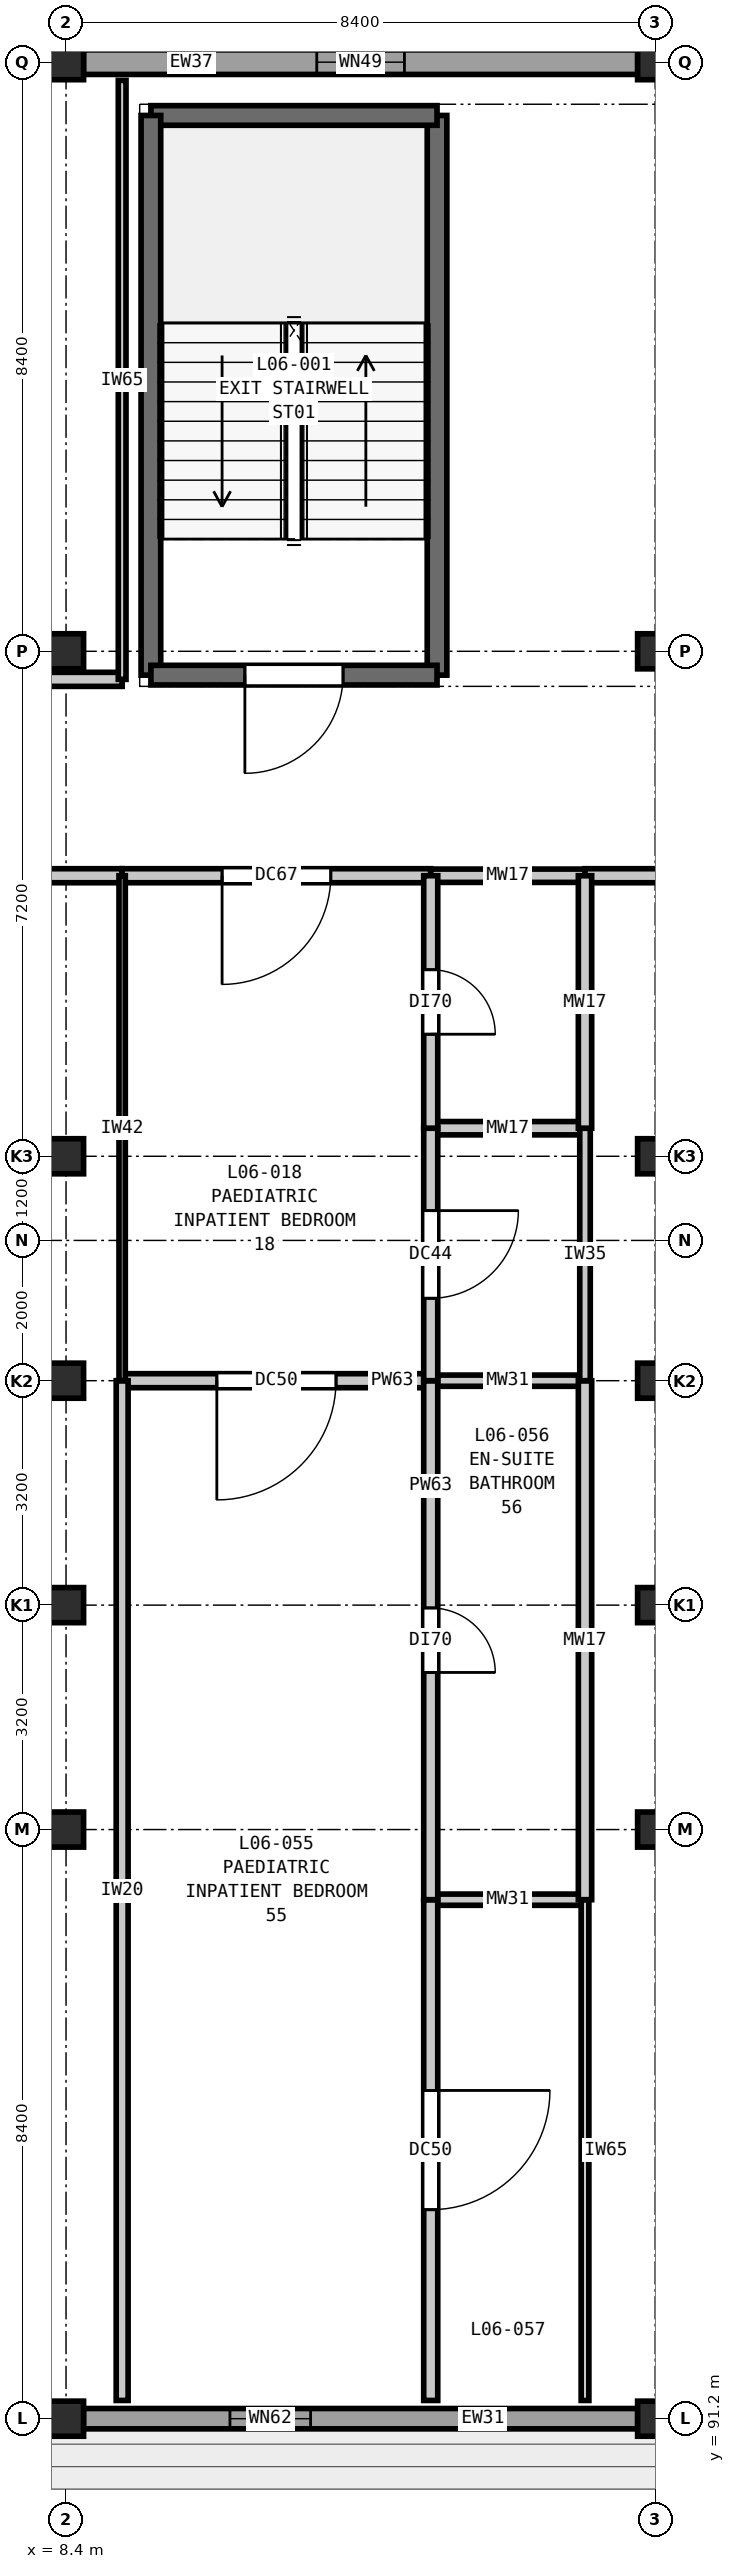
"""IFC4 building model, lengths in metres.
Left out: names, types, materials, properties, quantities, classifications, styles, units other than length and angle.
Written with IfcOpenShell. Run it as: python <this file> out.ifc"""

import sys

from ifc_helpers import new_model, si_unit, direction, frame, frame_2d, origin, origin_2d, place, context, subcontext, project, spatial, rectangle, extrude, element, fill, save


model = new_model("IFC4")
c1 = context("Model", 3, precision=1e-05, world=origin(), true_north=direction((0.0, 1.0)))
c2 = subcontext(c1, "Body", "Model", "MODEL_VIEW")
j1 = project(units=[si_unit("LENGTHUNIT", "METRE"), si_unit("PLANEANGLEUNIT", "RADIAN")], contexts=[c1])
p1 = place(None, origin())
s1 = spatial("IfcSite", under=j1, at=p1, CompositionType="ELEMENT")
p2 = place(p1, origin())
s2 = spatial("IfcBuilding", under=s1, at=p2, CompositionType="ELEMENT")
p3 = place(p2, frame((0.0, 0.0, 28.8)))
s3 = spatial("IfcBuildingStorey", under=s2, at=p3, CompositionType="ELEMENT", Elevation=28.8)
for number, where, z_axis, x_axis in (
    (1, (8.4, 91.2, 0.0), (0.0, 0.0, 1.0), (1.0, 0.0, 0.0)),
    (2, (8.4, 99.6, 0.0), (0.0, 0.0, 1.0), (1.0, 0.0, 0.0)),
    (3, (8.4, 102.8, 0.0), (0.0, 0.0, 1.0), (1.0, 0.0, 0.0)),
    (4, (8.4, 106.0, 0.0), (0.0, 0.0, 1.0), (1.0, 0.0, 0.0)),
    (5, (8.4, 109.2, 0.0), (0.0, 0.0, 1.0), (1.0, 0.0, 0.0)),
    (6, (8.4, 116.4, 0.0), (0.0, 0.0, 1.0), (1.0, 0.0, 0.0)),
    (7, (8.4, 124.8, 0.0), (0.0, 0.0, 1.0), (1.0, 0.0, 0.0)),
    (8, (16.8, 91.2, 0.0), (0.0, 0.0, 1.0), (1.0, 0.0, 0.0)),
    (9, (16.8, 99.6, 0.0), (0.0, 0.0, 1.0), (1.0, 0.0, 0.0)),
    (10, (16.8, 102.8, 0.0), (0.0, 0.0, 1.0), (1.0, 0.0, 0.0)),
    (11, (16.8, 106.0, 0.0), (0.0, 0.0, 1.0), (1.0, 0.0, 0.0)),
    (12, (16.8, 109.2, 0.0), (0.0, 0.0, 1.0), (1.0, 0.0, 0.0)),
    (13, (16.8, 116.4, 0.0), (0.0, 0.0, 1.0), (1.0, 0.0, 0.0)),
    (14, (16.8, 124.8, 0.0), (0.0, 0.0, 1.0), (1.0, 0.0, 0.0)),
):
    element("IfcColumn", number, at=place(p3, frame(where, z_axis=z_axis, x_axis=x_axis)), inside=s3, PredefinedType="COLUMN", context=c2, shape_type="SweptSolid", body=[
        extrude(rectangle(XDim=0.5, YDim=0.5, at=origin_2d()), origin(), (0.0, 0.0, 1.0), 4.2),
    ])
p4 = place(p3, frame((8.648, 124.8, 0.0), z_axis=(0.0, 0.0, 1.0), x_axis=(1.0, 0.0, 0.0)))
e15 = element("IfcWall", 15, at=p4, inside=s3, PredefinedType="SOLIDWALL", context=c2, shape_type="SweptSolid", body=[
    extrude(rectangle(XDim=7.904, YDim=0.35, at=frame_2d((3.952, 0.0))), origin(), (0.0, 0.0, 1.0), 3.48),
])
p5 = place(p4, frame((3.327, 0.0, 0.9)))
e16 = element("IfcOpeningElement", 16, at=p5, cuts=e15, PredefinedType="OPENING", context=c2, shape_type="SweptSolid", body=[
    extrude(rectangle(XDim=1.25, YDim=1.95, at=frame_2d((0.625, 0.975))), frame((0.0, 0.185, 0.0), z_axis=(0.0, -1.0, 0.0), x_axis=(1.0, 0.0, 0.0)), (0.0, 0.0, 1.0), 0.37),
])
p6 = place(p3, frame((16.552, 91.2, 0.0), z_axis=(0.0, 0.0, 1.0), x_axis=(-1.0, 0.0, 0.0)))
e17 = element("IfcWall", 17, at=p6, inside=s3, PredefinedType="SOLIDWALL", context=c2, shape_type="SweptSolid", body=[
    extrude(rectangle(XDim=7.904, YDim=0.29, at=frame_2d((3.952, 0.0))), origin(), (0.0, 0.0, 1.0), 3.48),
])
p7 = place(p6, frame((4.665, 0.0, 0.9)))
e18 = element("IfcOpeningElement", 18, at=p7, cuts=e17, PredefinedType="OPENING", context=c2, shape_type="SweptSolid", body=[
    extrude(rectangle(XDim=1.15, YDim=1.4, at=frame_2d((0.575, 0.7))), frame((0.0, 0.155, 0.0), z_axis=(0.0, -1.0, 0.0), x_axis=(1.0, 0.0, 0.0)), (0.0, 0.0, 1.0), 0.31),
])
p8 = place(p3, frame((13.69, 116.06, 0.0), z_axis=(0.0, 0.0, 1.0), x_axis=(0.0, 1.0, 0.0)))
e19 = element("IfcWall", 19, at=p8, inside=s3, PredefinedType="SHEAR", context=c2, shape_type="SweptSolid", body=[
    extrude(rectangle(XDim=7.98, YDim=0.28, at=frame_2d((3.99, 0.0))), origin(), (0.0, 0.0, 1.0), 4.2),
])
p9 = place(p3, frame((13.69, 124.04, 0.0), z_axis=(0.0, 0.0, 1.0), x_axis=(-1.0, 0.0, 0.0)))
e20 = element("IfcWall", 20, at=p9, inside=s3, PredefinedType="SHEAR", context=c2, shape_type="SweptSolid", body=[
    extrude(rectangle(XDim=4.08, YDim=0.28, at=frame_2d((2.04, 0.0))), origin(), (0.0, 0.0, 1.0), 4.2),
])
p10 = place(p3, frame((9.61, 124.04, 0.0), z_axis=(0.0, 0.0, 1.0), x_axis=(0.0, -1.0, 0.0)))
e21 = element("IfcWall", 21, at=p10, inside=s3, PredefinedType="SHEAR", context=c2, shape_type="SweptSolid", body=[
    extrude(rectangle(XDim=7.98, YDim=0.28, at=frame_2d((3.99, 0.0))), origin(), (0.0, 0.0, 1.0), 4.2),
])
p11 = place(p3, frame((9.61, 116.06, 0.0), z_axis=(0.0, 0.0, 1.0), x_axis=(1.0, 0.0, 0.0)))
e22 = element("IfcWall", 22, at=p11, inside=s3, PredefinedType="SHEAR", context=c2, shape_type="SweptSolid", body=[
    extrude(rectangle(XDim=4.08, YDim=0.28, at=frame_2d((2.04, 0.0))), origin(), (0.0, 0.0, 1.0), 4.2),
])
p12 = place(p11, frame((1.34, 0.0, 0.0)))
e23 = element("IfcOpeningElement", 23, at=p12, cuts=e22, PredefinedType="OPENING", context=c2, shape_type="SweptSolid", body=[
    extrude(rectangle(XDim=1.4, YDim=2.2, at=frame_2d((0.7, 1.1))), frame((0.0, 0.15, 0.0), z_axis=(0.0, -1.0, 0.0), x_axis=(1.0, 0.0, 0.0)), (0.0, 0.0, 1.0), 0.3),
])
p13 = place(p3, frame((13.6, 98.6, 0.0), z_axis=(0.0, 0.0, 1.0), x_axis=(1.0, 0.0, 0.0)))
e24 = element("IfcWall", 24, at=p13, inside=s3, PredefinedType="PLUMBINGWALL", context=c2, shape_type="SweptSolid", body=[
    extrude(rectangle(XDim=2.2, YDim=0.16, at=frame_2d((1.1, 0.0))), origin(), (0.0, 0.0, 1.0), 3.92),
])
p14 = place(p3, frame((9.2, 106.0, 0.0), z_axis=(0.0, 0.0, 1.0), x_axis=(1.0, 0.0, 0.0)))
e25 = element("IfcWall", 25, at=p14, inside=s3, PredefinedType="PARTITIONING", context=c2, shape_type="SweptSolid", body=[
    extrude(rectangle(XDim=4.4, YDim=0.2, at=frame_2d((2.2, 0.0))), origin(), (0.0, 0.0, 1.0), 3.635),
])
p15 = place(p14, frame((1.35, 0.0, 0.0)))
e26 = element("IfcOpeningElement", 26, at=p15, cuts=e25, PredefinedType="OPENING", context=c2, shape_type="SweptSolid", body=[
    extrude(rectangle(XDim=1.7, YDim=2.3, at=frame_2d((0.85, 1.15))), frame((0.0, 0.11, 0.0), z_axis=(0.0, -1.0, 0.0), x_axis=(1.0, 0.0, 0.0)), (0.0, 0.0, 1.0), 0.22),
])
p16 = place(p3, frame((13.6, 106.0, 0.0), z_axis=(0.0, 0.0, 1.0), x_axis=(1.0, 0.0, 0.0)))
e27 = element("IfcWall", 27, at=p16, inside=s3, PredefinedType="PLUMBINGWALL", context=c2, shape_type="SweptSolid", body=[
    extrude(rectangle(XDim=2.2, YDim=0.16, at=frame_2d((1.1, 0.0))), origin(), (0.0, 0.0, 1.0), 3.635),
])
p17 = place(p3, frame((13.6, 109.6, 0.0), z_axis=(0.0, 0.0, 1.0), x_axis=(1.0, 0.0, 0.0)))
e28 = element("IfcWall", 28, at=p17, inside=s3, PredefinedType="PLUMBINGWALL", context=c2, shape_type="SweptSolid", body=[
    extrude(rectangle(XDim=2.2, YDim=0.19, at=frame_2d((1.1, 0.0))), origin(), (0.0, 0.0, 1.0), 3.92),
])
p18 = place(p3, frame((0.26, 113.2, 0.0), z_axis=(0.0, 0.0, 1.0), x_axis=(1.0, 0.0, 0.0)))
e29 = element("IfcWall", 29, at=p18, inside=s3, PredefinedType="PARTITIONING", context=c2, shape_type="SweptSolid", body=[
    extrude(rectangle(XDim=8.94, YDim=0.2, at=frame_2d((4.47, 0.0))), origin(), (0.0, 0.0, 1.0), 3.92),
])
p19 = place(p18, frame((3.745, 0.0, 0.0)))
e30 = element("IfcOpeningElement", 30, at=p19, cuts=e29, PredefinedType="OPENING", context=c2, shape_type="SweptSolid", body=[
    extrude(rectangle(XDim=1.45, YDim=2.25, at=frame_2d((0.725, 1.125))), frame((0.0, 0.11, 0.0), z_axis=(0.0, -1.0, 0.0), x_axis=(1.0, 0.0, 0.0)), (0.0, 0.0, 1.0), 0.22),
])
p20 = place(p3, frame((9.2, 113.2, 0.0), z_axis=(0.0, 0.0, 1.0), x_axis=(1.0, 0.0, 0.0)))
e31 = element("IfcWall", 31, at=p20, inside=s3, PredefinedType="PARTITIONING", context=c2, shape_type="SweptSolid", body=[
    extrude(rectangle(XDim=4.4, YDim=0.2, at=frame_2d((2.2, 0.0))), origin(), (0.0, 0.0, 1.0), 3.92),
])
p21 = place(p20, frame((1.425, 0.0, 0.0)))
e32 = element("IfcOpeningElement", 32, at=p21, cuts=e31, PredefinedType="OPENING", context=c2, shape_type="SweptSolid", body=[
    extrude(rectangle(XDim=1.55, YDim=2.25, at=frame_2d((0.775, 1.125))), frame((0.0, 0.11, 0.0), z_axis=(0.0, -1.0, 0.0), x_axis=(1.0, 0.0, 0.0)), (0.0, 0.0, 1.0), 0.22),
])
p22 = place(p3, frame((13.6, 113.2, 0.0), z_axis=(0.0, 0.0, 1.0), x_axis=(1.0, 0.0, 0.0)))
e33 = element("IfcWall", 33, at=p22, inside=s3, PredefinedType="PLUMBINGWALL", context=c2, shape_type="SweptSolid", body=[
    extrude(rectangle(XDim=2.2, YDim=0.19, at=frame_2d((1.1, 0.0))), origin(), (0.0, 0.0, 1.0), 3.92),
])
p23 = place(p3, frame((15.8, 113.2, 0.0), z_axis=(0.0, 0.0, 1.0), x_axis=(1.0, 0.0, 0.0)))
e34 = element("IfcWall", 34, at=p23, inside=s3, PredefinedType="PARTITIONING", context=c2, shape_type="SweptSolid", body=[
    extrude(rectangle(XDim=8.4, YDim=0.2, at=frame_2d((4.2, 0.0))), origin(), (0.0, 0.0, 1.0), 3.92),
])
p24 = place(p23, frame((3.35, 0.0, 0.0)))
e35 = element("IfcOpeningElement", 35, at=p24, cuts=e34, PredefinedType="OPENING", context=c2, shape_type="SweptSolid", body=[
    extrude(rectangle(XDim=1.7, YDim=2.3, at=frame_2d((0.85, 1.15))), frame((0.0, 0.11, 0.0), z_axis=(0.0, -1.0, 0.0), x_axis=(1.0, 0.0, 0.0)), (0.0, 0.0, 1.0), 0.22),
])
p25 = place(p3, frame((0.26, 116.0, 0.0), z_axis=(0.0, 0.0, 1.0), x_axis=(1.0, 0.0, 0.0)))
e36 = element("IfcWall", 36, at=p25, inside=s3, PredefinedType="PARTITIONING", context=c2, shape_type="SweptSolid", body=[
    extrude(rectangle(XDim=8.94, YDim=0.2, at=frame_2d((4.47, 0.0))), origin(), (0.0, 0.0, 1.0), 3.92),
])
p26 = place(p25, frame((3.845, 0.0, 0.0)))
e37 = element("IfcOpeningElement", 37, at=p26, cuts=e36, PredefinedType="OPENING", context=c2, shape_type="SweptSolid", body=[
    extrude(rectangle(XDim=1.25, YDim=2.15, at=frame_2d((0.625, 1.075))), frame((0.0, 0.11, 0.0), z_axis=(0.0, -1.0, 0.0), x_axis=(1.0, 0.0, 0.0)), (0.0, 0.0, 1.0), 0.22),
])
p27 = place(p3, frame((9.2, 91.46, 0.0), z_axis=(0.0, 0.0, 1.0), x_axis=(0.0, 1.0, 0.0)))
e38 = element("IfcWall", 38, at=p27, inside=s3, PredefinedType="PARTITIONING", context=c2, shape_type="SweptSolid", body=[
    extrude(rectangle(XDim=14.54, YDim=0.17, at=frame_2d((7.27, 0.0))), origin(), (0.0, 0.0, 1.0), 3.92),
])
p28 = place(p3, frame((9.2, 106.0, 0.0), z_axis=(0.0, 0.0, 1.0), x_axis=(0.0, 1.0, 0.0)))
e39 = element("IfcWall", 39, at=p28, inside=s3, PredefinedType="PARTITIONING", context=c2, shape_type="SweptSolid", body=[
    extrude(rectangle(XDim=7.2, YDim=0.09, at=frame_2d((3.6, 0.0))), origin(), (0.0, 0.0, 1.0), 3.92),
])
p29 = place(p3, frame((9.2, 116.0, 0.0), z_axis=(0.0, 0.0, 1.0), x_axis=(0.0, 1.0, 0.0)))
e40 = element("IfcWall", 40, at=p29, inside=s3, PredefinedType="PARTITIONING", context=c2, shape_type="SweptSolid", body=[
    extrude(rectangle(XDim=8.54, YDim=0.11, at=frame_2d((4.27, 0.0))), origin(), (0.0, 0.0, 1.0), 3.92),
])
p30 = place(p3, frame((13.6, 91.46, 0.0), z_axis=(0.0, 0.0, 1.0), x_axis=(0.0, 1.0, 0.0)))
e41 = element("IfcWall", 41, at=p30, inside=s3, PredefinedType="PARTITIONING", context=c2, shape_type="SweptSolid", body=[
    extrude(rectangle(XDim=7.14, YDim=0.2, at=frame_2d((3.57, 0.0))), origin(), (0.0, 0.0, 1.0), 3.92),
])
p31 = place(p30, frame((2.72, 0.0, 0.0)))
e42 = element("IfcOpeningElement", 42, at=p31, cuts=e41, PredefinedType="OPENING", context=c2, shape_type="SweptSolid", body=[
    extrude(rectangle(XDim=1.7, YDim=2.3, at=frame_2d((0.85, 1.15))), frame((0.0, 0.11, 0.0), z_axis=(0.0, -1.0, 0.0), x_axis=(1.0, 0.0, 0.0)), (0.0, 0.0, 1.0), 0.22),
])
p32 = place(p3, frame((13.6, 98.6, 0.0), z_axis=(0.0, 0.0, 1.0), x_axis=(0.0, 1.0, 0.0)))
e43 = element("IfcWall", 43, at=p32, inside=s3, PredefinedType="PARTITIONING", context=c2, shape_type="SweptSolid", body=[
    extrude(rectangle(XDim=7.4, YDim=0.2, at=frame_2d((3.7, 0.0))), origin(), (0.0, 0.0, 1.0), 3.92),
])
p33 = place(p32, frame((3.24, 0.0, 0.0)))
e44 = element("IfcOpeningElement", 44, at=p33, cuts=e43, PredefinedType="OPENING", context=c2, shape_type="SweptSolid", body=[
    extrude(rectangle(XDim=0.92, YDim=2.1, at=frame_2d((0.46, 1.05))), frame((0.0, 0.11, 0.0), z_axis=(0.0, -1.0, 0.0), x_axis=(1.0, 0.0, 0.0)), (0.0, 0.0, 1.0), 0.22),
])
p34 = place(p3, frame((13.6, 106.0, 0.0), z_axis=(0.0, 0.0, 1.0), x_axis=(0.0, 1.0, 0.0)))
e45 = element("IfcWall", 45, at=p34, inside=s3, PredefinedType="PARTITIONING", context=c2, shape_type="SweptSolid", body=[
    extrude(rectangle(XDim=3.6, YDim=0.2, at=frame_2d((1.8, 0.0))), origin(), (0.0, 0.0, 1.0), 3.92),
])
p35 = place(p34, frame((1.175, 0.0, 0.0)))
e46 = element("IfcOpeningElement", 46, at=p35, cuts=e45, PredefinedType="OPENING", context=c2, shape_type="SweptSolid", body=[
    extrude(rectangle(XDim=1.25, YDim=2.15, at=frame_2d((0.625, 1.075))), frame((0.0, 0.11, 0.0), z_axis=(0.0, -1.0, 0.0), x_axis=(1.0, 0.0, 0.0)), (0.0, 0.0, 1.0), 0.22),
])
p36 = place(p3, frame((13.6, 109.6, 0.0), z_axis=(0.0, 0.0, 1.0), x_axis=(0.0, 1.0, 0.0)))
e47 = element("IfcWall", 47, at=p36, inside=s3, PredefinedType="PARTITIONING", context=c2, shape_type="SweptSolid", body=[
    extrude(rectangle(XDim=3.6, YDim=0.2, at=frame_2d((1.8, 0.0))), origin(), (0.0, 0.0, 1.0), 3.92),
])
p37 = place(p36, frame((1.34, 0.0, 0.0)))
e48 = element("IfcOpeningElement", 48, at=p37, cuts=e47, PredefinedType="OPENING", context=c2, shape_type="SweptSolid", body=[
    extrude(rectangle(XDim=0.92, YDim=2.1, at=frame_2d((0.46, 1.05))), frame((0.0, 0.11, 0.0), z_axis=(0.0, -1.0, 0.0), x_axis=(1.0, 0.0, 0.0)), (0.0, 0.0, 1.0), 0.22),
])
p38 = place(p3, frame((15.8, 91.46, 0.0), z_axis=(0.0, 0.0, 1.0), x_axis=(0.0, 1.0, 0.0)))
e49 = element("IfcWall", 49, at=p38, inside=s3, PredefinedType="PARTITIONING", context=c2, shape_type="SweptSolid", body=[
    extrude(rectangle(XDim=7.14, YDim=0.11, at=frame_2d((3.57, 0.0))), origin(), (0.0, 0.0, 1.0), 3.92),
])
p39 = place(p3, frame((15.8, 98.6, 0.0), z_axis=(0.0, 0.0, 1.0), x_axis=(0.0, 1.0, 0.0)))
e50 = element("IfcWall", 50, at=p39, inside=s3, PredefinedType="PLUMBINGWALL", context=c2, shape_type="SweptSolid", body=[
    extrude(rectangle(XDim=7.4, YDim=0.19, at=frame_2d((3.7, 0.0))), origin(), (0.0, 0.0, 1.0), 3.92),
])
p40 = place(p3, frame((15.8, 106.0, 0.0), z_axis=(0.0, 0.0, 1.0), x_axis=(0.0, 1.0, 0.0)))
e51 = element("IfcWall", 51, at=p40, inside=s3, PredefinedType="PARTITIONING", context=c2, shape_type="SweptSolid", body=[
    extrude(rectangle(XDim=3.6, YDim=0.15, at=frame_2d((1.8, 0.0))), origin(), (0.0, 0.0, 1.0), 3.92),
])
p41 = place(p3, frame((15.8, 109.6, 0.0), z_axis=(0.0, 0.0, 1.0), x_axis=(0.0, 1.0, 0.0)))
e52 = element("IfcWall", 52, at=p41, inside=s3, PredefinedType="PLUMBINGWALL", context=c2, shape_type="SweptSolid", body=[
    extrude(rectangle(XDim=3.6, YDim=0.19, at=frame_2d((1.8, 0.0))), origin(), (0.0, 0.0, 1.0), 3.92),
])
p42 = place(p5, origin())
e53 = element("IfcWindow", 53, at=p42, inside=s3, PartitioningType="SINGLE_PANEL", PredefinedType="WINDOW", context=c2, shape_type="SweptSolid", body=[
    extrude(rectangle(XDim=1.25, YDim=1.95, at=frame_2d((0.625, 0.975))), frame((0.0, 0.03, 0.0), z_axis=(0.0, -1.0, 0.0), x_axis=(1.0, 0.0, 0.0)), (0.0, 0.0, 1.0), 0.06),
])
fill(e16, e53)
p43 = place(p7, origin())
e54 = element("IfcWindow", 54, at=p43, inside=s3, PartitioningType="SINGLE_PANEL", PredefinedType="WINDOW", context=c2, shape_type="SweptSolid", body=[
    extrude(rectangle(XDim=1.15, YDim=1.4, at=frame_2d((0.575, 0.7))), frame((0.0, 0.03, 0.0), z_axis=(0.0, -1.0, 0.0), x_axis=(1.0, 0.0, 0.0)), (0.0, 0.0, 1.0), 0.06),
])
fill(e18, e54)
p44 = place(p12, frame((1.4, 0.0, 0.0), z_axis=(0.0, 0.0, 1.0), x_axis=(-1.0, 0.0, 0.0)))
e55 = element("IfcDoor", 55, at=p44, inside=s3, OperationType="SINGLE_SWING_RIGHT", PredefinedType="DOOR", context=c2, shape_type="SweptSolid", body=[
    extrude(rectangle(XDim=1.4, YDim=2.2, at=frame_2d((0.7, 1.1))), frame((0.0, 0.025, 0.0), z_axis=(0.0, -1.0, 0.0), x_axis=(1.0, 0.0, 0.0)), (0.0, 0.0, 1.0), 0.05),
])
fill(e23, e55)
p45 = place(p15, frame((1.7, 0.0, 0.0), z_axis=(0.0, 0.0, 1.0), x_axis=(-1.0, 0.0, 0.0)))
e56 = element("IfcDoor", 56, at=p45, inside=s3, OperationType="SINGLE_SWING_RIGHT", PredefinedType="DOOR", context=c2, shape_type="SweptSolid", body=[
    extrude(rectangle(XDim=1.7, YDim=2.3, at=frame_2d((0.85, 1.15))), frame((0.0, 0.025, 0.0), z_axis=(0.0, -1.0, 0.0), x_axis=(1.0, 0.0, 0.0)), (0.0, 0.0, 1.0), 0.05),
])
fill(e26, e56)
p46 = place(p21, frame((1.55, 0.0, 0.0), z_axis=(0.0, 0.0, 1.0), x_axis=(-1.0, 0.0, 0.0)))
e57 = element("IfcDoor", 57, at=p46, inside=s3, OperationType="SINGLE_SWING_RIGHT", PredefinedType="DOOR", context=c2, shape_type="SweptSolid", body=[
    extrude(rectangle(XDim=1.55, YDim=2.25, at=frame_2d((0.775, 1.125))), frame((0.0, 0.025, 0.0), z_axis=(0.0, -1.0, 0.0), x_axis=(1.0, 0.0, 0.0)), (0.0, 0.0, 1.0), 0.05),
])
fill(e32, e57)
p47 = place(p31, frame((1.7, 0.0, 0.0), z_axis=(0.0, 0.0, 1.0), x_axis=(-1.0, 0.0, 0.0)))
e58 = element("IfcDoor", 58, at=p47, inside=s3, OperationType="SINGLE_SWING_LEFT", PredefinedType="DOOR", context=c2, shape_type="SweptSolid", body=[
    extrude(rectangle(XDim=1.7, YDim=2.3, at=frame_2d((0.85, 1.15))), frame((0.0, 0.025, 0.0), z_axis=(0.0, -1.0, 0.0), x_axis=(1.0, 0.0, 0.0)), (0.0, 0.0, 1.0), 0.05),
])
fill(e42, e58)
p48 = place(p33, frame((0.92, 0.0, 0.0), z_axis=(0.0, 0.0, 1.0), x_axis=(-1.0, 0.0, 0.0)))
e59 = element("IfcDoor", 59, at=p48, inside=s3, OperationType="SINGLE_SWING_RIGHT", PredefinedType="DOOR", context=c2, shape_type="SweptSolid", body=[
    extrude(rectangle(XDim=0.92, YDim=2.1, at=frame_2d((0.46, 1.05))), frame((0.0, 0.025, 0.0), z_axis=(0.0, -1.0, 0.0), x_axis=(1.0, 0.0, 0.0)), (0.0, 0.0, 1.0), 0.05),
])
fill(e44, e59)
p49 = place(p35, frame((1.25, 0.0, 0.0), z_axis=(0.0, 0.0, 1.0), x_axis=(-1.0, 0.0, 0.0)))
e60 = element("IfcDoor", 60, at=p49, inside=s3, OperationType="SINGLE_SWING_LEFT", PredefinedType="DOOR", context=c2, shape_type="SweptSolid", body=[
    extrude(rectangle(XDim=1.25, YDim=2.15, at=frame_2d((0.625, 1.075))), frame((0.0, 0.025, 0.0), z_axis=(0.0, -1.0, 0.0), x_axis=(1.0, 0.0, 0.0)), (0.0, 0.0, 1.0), 0.05),
])
fill(e46, e60)
p50 = place(p37, frame((0.92, 0.0, 0.0), z_axis=(0.0, 0.0, 1.0), x_axis=(-1.0, 0.0, 0.0)))
e61 = element("IfcDoor", 61, at=p50, inside=s3, OperationType="SINGLE_SWING_RIGHT", PredefinedType="DOOR", context=c2, shape_type="SweptSolid", body=[
    extrude(rectangle(XDim=0.92, YDim=2.1, at=frame_2d((0.46, 1.05))), frame((0.0, 0.025, 0.0), z_axis=(0.0, -1.0, 0.0), x_axis=(1.0, 0.0, 0.0)), (0.0, 0.0, 1.0), 0.05),
])
fill(e48, e61)
save(model, sys.argv[1])
